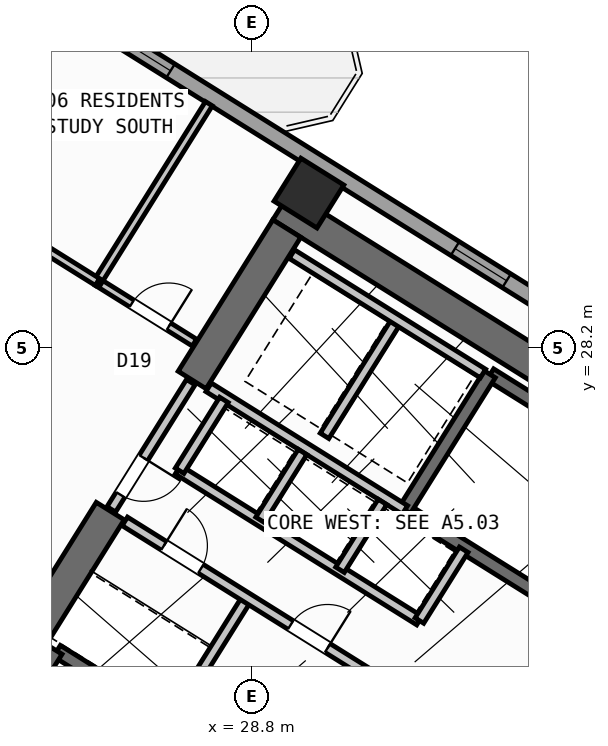
"""IFC4 building model, lengths in metres.
Left out: names, types, materials, properties, quantities, classifications, styles, units other than length and angle.
Written with IfcOpenShell. Run it as: python <this file> out.ifc"""

import sys

from ifc_helpers import new_model, si_unit, direction, frame, frame_2d, origin, origin_2d, place, context, subcontext, project, spatial, rectangle, hollow_rectangle, extrude, source, transform, mapped, element, fill, save


model = new_model("IFC4")
c1 = context("Model", 3, precision=1e-05, world=origin(), true_north=direction((0.0, 1.0)))
c2 = subcontext(c1, "Body", "Model", "MODEL_VIEW")
j1 = project(units=[si_unit("LENGTHUNIT", "METRE"), si_unit("PLANEANGLEUNIT", "RADIAN")], contexts=[c1])
p1 = place(None, origin())
s1 = spatial("IfcSite", under=j1, at=p1, CompositionType="ELEMENT")
p2 = place(p1, origin())
s2 = spatial("IfcBuilding", under=s1, at=p2, CompositionType="ELEMENT")
p3 = place(p2, frame((0.0, 0.0, 27.6)))
s3 = spatial("IfcBuildingStorey", under=s2, at=p3, CompositionType="ELEMENT", Elevation=27.6)
p4 = place(p3, frame((40.615, 23.983, 0.0), z_axis=(0.0, 0.0, 1.0), x_axis=(-0.848045953968, 0.529922692436, 0.0)))
e1 = element("IfcWall", 1, at=p4, inside=s3, PredefinedType="SHEAR", context=c2, shape_type="SweptSolid", body=[
    extrude(rectangle(XDim=13.24, YDim=0.65, at=frame_2d((6.62, 0.0))), origin(), (0.0, 0.0, 1.0), 3.35),
])
p5 = place(p3, frame((29.491, 30.552, 0.0), z_axis=(0.0, 0.0, 1.0), x_axis=(-0.529893103397, -0.8480644427, 0.0)))
e2 = element("IfcWall", 2, at=p5, inside=s3, PredefinedType="SHEAR", context=c2, shape_type="SweptSolid", body=[
    extrude(rectangle(XDim=3.525, YDim=0.65, at=frame_2d((1.763, 0.0))), origin(), (0.0, 0.0, 1.0), 3.35),
])
p6 = place(p3, frame((26.007, 24.976, 0.0), z_axis=(0.0, 0.0, 1.0), x_axis=(-0.529916319127, -0.848049936456, 0.0)))
e3 = element("IfcWall", 3, at=p6, inside=s3, PredefinedType="SHEAR", context=c2, shape_type="SweptSolid", body=[
    extrude(rectangle(XDim=6.375, YDim=0.65, at=frame_2d((3.188, 0.0))), origin(), (0.0, 0.0, 1.0), 3.35),
])
m1 = source(origin(), c2, "Body", "SweptSolid", [
    extrude(hollow_rectangle(XDim=1.0, YDim=1.0, WallThickness=0.04, at=origin_2d()), origin(), (0.0, 0.0, 1.0), 3.6),
])
for number, where, z_axis, x_axis in (
    (4, (29.928, 31.251, 0.0), (0.0, 0.0, 1.0), (-0.848, 0.53, 0.0)),
    (5, (24.5, 34.643, 0.0), (0.0, 0.0, 1.0), (-0.848, 0.53, 0.0)),
):
    element("IfcColumn", number, at=place(p3, frame(where, z_axis=z_axis, x_axis=x_axis)), inside=s3, PredefinedType="COLUMN", context=c2, shape_type="MappedRepresentation", body=[
        mapped(m1, transform((0.0, 0.0, 0.0), scale=1.0)),
    ])
p7 = place(p3, frame((29.268, 6.429, 0.0), z_axis=(0.0, 0.0, 1.0), x_axis=(-0.848049971435, 0.529916263149, 0.0)))
e6 = element("IfcWall", 6, at=p7, inside=s3, PredefinedType="STANDARD", context=c2, shape_type="SweptSolid", body=[
    extrude(rectangle(XDim=31.588, YDim=0.32, at=frame_2d((15.794, 0.0))), origin(), (0.0, 0.0, 1.0), 3.35),
])
p8 = place(p7, frame((16.362, 0.0, 0.0)))
e7 = element("IfcOpeningElement", 7, at=p8, cuts=e6, PredefinedType="OPENING", context=c2, shape_type="SweptSolid", body=[
    extrude(rectangle(XDim=1.2, YDim=2.15, at=frame_2d((0.6, 1.075))), frame((0.0, 0.17, 0.0), z_axis=(0.0, -1.0, 0.0), x_axis=(1.0, 0.0, 0.0)), (0.0, 0.0, 1.0), 0.34),
])
p9 = place(p7, frame((2.989, 0.0, 0.8)))
e8 = element("IfcOpeningElement", 8, at=p9, cuts=e6, PredefinedType="OPENING", context=c2, shape_type="SweptSolid", body=[
    extrude(rectangle(XDim=2.1, YDim=1.55, at=frame_2d((1.05, 0.775))), frame((0.0, 0.17, 0.0), z_axis=(0.0, -1.0, 0.0), x_axis=(1.0, 0.0, 0.0)), (0.0, 0.0, 1.0), 0.34),
])
p10 = place(p7, frame((8.359, 0.0, 0.8)))
e9 = element("IfcOpeningElement", 9, at=p10, cuts=e6, PredefinedType="OPENING", context=c2, shape_type="SweptSolid", body=[
    extrude(rectangle(XDim=2.1, YDim=1.55, at=frame_2d((1.05, 0.775))), frame((0.0, 0.17, 0.0), z_axis=(0.0, -1.0, 0.0), x_axis=(1.0, 0.0, 0.0)), (0.0, 0.0, 1.0), 0.34),
])
p11 = place(p7, frame((13.284, 0.0, 0.95)))
e10 = element("IfcOpeningElement", 10, at=p11, cuts=e6, PredefinedType="OPENING", context=c2, shape_type="SweptSolid", body=[
    extrude(rectangle(XDim=1.2, YDim=1.4, at=frame_2d((0.6, 0.7))), frame((0.0, 0.17, 0.0), z_axis=(0.0, -1.0, 0.0), x_axis=(1.0, 0.0, 0.0)), (0.0, 0.0, 1.0), 0.34),
])
p12 = place(p7, frame((29.188, 0.0, 0.95)))
e11 = element("IfcOpeningElement", 11, at=p12, cuts=e6, PredefinedType="OPENING", context=c2, shape_type="SweptSolid", body=[
    extrude(rectangle(XDim=1.2, YDim=1.4, at=frame_2d((0.6, 0.7))), frame((0.0, 0.17, 0.0), z_axis=(0.0, -1.0, 0.0), x_axis=(1.0, 0.0, 0.0)), (0.0, 0.0, 1.0), 0.34),
])
p13 = place(p7, frame((19.11, 0.0, 1.0)))
e12 = element("IfcOpeningElement", 12, at=p13, cuts=e6, PredefinedType="OPENING", context=c2, shape_type="SweptSolid", body=[
    extrude(rectangle(XDim=0.9, YDim=1.25, at=frame_2d((0.45, 0.625))), frame((0.0, 0.17, 0.0), z_axis=(0.0, -1.0, 0.0), x_axis=(1.0, 0.0, 0.0)), (0.0, 0.0, 1.0), 0.34),
])
p14 = place(p7, frame((21.226, 0.0, 1.0)))
e13 = element("IfcOpeningElement", 13, at=p14, cuts=e6, PredefinedType="OPENING", context=c2, shape_type="SweptSolid", body=[
    extrude(rectangle(XDim=0.9, YDim=1.25, at=frame_2d((0.45, 0.625))), frame((0.0, 0.17, 0.0), z_axis=(0.0, -1.0, 0.0), x_axis=(1.0, 0.0, 0.0)), (0.0, 0.0, 1.0), 0.34),
])
p15 = place(p7, frame((23.014, 0.0, 1.0)))
e14 = element("IfcOpeningElement", 14, at=p15, cuts=e6, PredefinedType="OPENING", context=c2, shape_type="SweptSolid", body=[
    extrude(rectangle(XDim=0.9, YDim=1.25, at=frame_2d((0.45, 0.625))), frame((0.0, 0.17, 0.0), z_axis=(0.0, -1.0, 0.0), x_axis=(1.0, 0.0, 0.0)), (0.0, 0.0, 1.0), 0.34),
])
p16 = place(p7, frame((24.802, 0.0, 1.0)))
e15 = element("IfcOpeningElement", 15, at=p16, cuts=e6, PredefinedType="OPENING", context=c2, shape_type="SweptSolid", body=[
    extrude(rectangle(XDim=0.9, YDim=1.25, at=frame_2d((0.45, 0.625))), frame((0.0, 0.17, 0.0), z_axis=(0.0, -1.0, 0.0), x_axis=(1.0, 0.0, 0.0)), (0.0, 0.0, 1.0), 0.34),
])
p17 = place(p7, frame((26.59, 0.0, 1.0)))
e16 = element("IfcOpeningElement", 16, at=p17, cuts=e6, PredefinedType="OPENING", context=c2, shape_type="SweptSolid", body=[
    extrude(rectangle(XDim=0.9, YDim=1.25, at=frame_2d((0.45, 0.625))), frame((0.0, 0.17, 0.0), z_axis=(0.0, -1.0, 0.0), x_axis=(1.0, 0.0, 0.0)), (0.0, 0.0, 1.0), 0.34),
])
p18 = place(p3, frame((14.138, 41.825, 0.0), z_axis=(0.0, 0.0, 1.0), x_axis=(0.848046498049, -0.529921821731, 0.0)))
e17 = element("IfcWall", 17, at=p18, inside=s3, PredefinedType="STANDARD", context=c2, shape_type="SweptSolid", body=[
    extrude(rectangle(XDim=31.588, YDim=0.32, at=frame_2d((15.794, 0.0))), origin(), (0.0, 0.0, 1.0), 3.35),
])
p19 = place(p18, frame((3.369, 0.0, 0.0)))
e18 = element("IfcOpeningElement", 18, at=p19, cuts=e17, PredefinedType="OPENING", context=c2, shape_type="SweptSolid", body=[
    extrude(rectangle(XDim=1.05, YDim=2.15, at=frame_2d((0.525, 1.075))), frame((0.0, 0.17, 0.0), z_axis=(0.0, -1.0, 0.0), x_axis=(1.0, 0.0, 0.0)), (0.0, 0.0, 1.0), 0.34),
])
p20 = place(p18, frame((0.946, 0.0, 0.85)))
e19 = element("IfcOpeningElement", 19, at=p20, cuts=e17, PredefinedType="OPENING", context=c2, shape_type="SweptSolid", body=[
    extrude(rectangle(XDim=1.8, YDim=1.5, at=frame_2d((0.9, 0.75))), frame((0.0, 0.17, 0.0), z_axis=(0.0, -1.0, 0.0), x_axis=(1.0, 0.0, 0.0)), (0.0, 0.0, 1.0), 0.34),
])
p21 = place(p18, frame((8.46, 0.0, 0.85)))
e20 = element("IfcOpeningElement", 20, at=p21, cuts=e17, PredefinedType="OPENING", context=c2, shape_type="SweptSolid", body=[
    extrude(rectangle(XDim=1.8, YDim=1.5, at=frame_2d((0.9, 0.75))), frame((0.0, 0.17, 0.0), z_axis=(0.0, -1.0, 0.0), x_axis=(1.0, 0.0, 0.0)), (0.0, 0.0, 1.0), 0.34),
])
p22 = place(p18, frame((13.899, 0.0, 0.85)))
e21 = element("IfcOpeningElement", 21, at=p22, cuts=e17, PredefinedType="OPENING", context=c2, shape_type="SweptSolid", body=[
    extrude(rectangle(XDim=1.5, YDim=1.5, at=frame_2d((0.75, 0.75))), frame((0.0, 0.17, 0.0), z_axis=(0.0, -1.0, 0.0), x_axis=(1.0, 0.0, 0.0)), (0.0, 0.0, 1.0), 0.34),
])
p23 = place(p18, frame((22.019, 0.0, 0.95)))
e22 = element("IfcOpeningElement", 22, at=p23, cuts=e17, PredefinedType="OPENING", context=c2, shape_type="SweptSolid", body=[
    extrude(rectangle(XDim=1.2, YDim=1.4, at=frame_2d((0.6, 0.7))), frame((0.0, 0.17, 0.0), z_axis=(0.0, -1.0, 0.0), x_axis=(1.0, 0.0, 0.0)), (0.0, 0.0, 1.0), 0.34),
])
p24 = place(p18, frame((27.569, 0.0, 0.95)))
e23 = element("IfcOpeningElement", 23, at=p24, cuts=e17, PredefinedType="OPENING", context=c2, shape_type="SweptSolid", body=[
    extrude(rectangle(XDim=1.2, YDim=1.4, at=frame_2d((0.6, 0.7))), frame((0.0, 0.17, 0.0), z_axis=(0.0, -1.0, 0.0), x_axis=(1.0, 0.0, 0.0)), (0.0, 0.0, 1.0), 0.34),
])
p25 = place(p3, frame((31.28, 18.261, 0.0), z_axis=(0.0, 0.0, 1.0), x_axis=(-0.848051618787, 0.529913626805, 0.0)))
e24 = element("IfcWall", 24, at=p25, inside=s3, PredefinedType="SHEAR", context=c2, shape_type="SweptSolid", body=[
    extrude(rectangle(XDim=7.46, YDim=0.26, at=frame_2d((3.73, 0.0))), origin(), (0.0, 0.0, 1.0), 3.35),
])
p26 = place(p25, frame((0.36, 0.0, 0.0)))
e25 = element("IfcOpeningElement", 25, at=p26, cuts=e24, PredefinedType="OPENING", context=c2, shape_type="SweptSolid", body=[
    extrude(rectangle(XDim=0.86, YDim=2.05, at=frame_2d((0.43, 1.025))), frame((0.0, 0.14, 0.0), z_axis=(0.0, -1.0, 0.0), x_axis=(1.0, 0.0, 0.0)), (0.0, 0.0, 1.0), 0.28),
])
p27 = place(p3, frame((24.945, 22.22, 0.0), z_axis=(0.0, 0.0, 1.0), x_axis=(-0.529908658664, -0.84805472316, 0.0)))
e26 = element("IfcWall", 26, at=p27, inside=s3, PredefinedType="SHEAR", context=c2, shape_type="SweptSolid", body=[
    extrude(rectangle(XDim=3.16, YDim=0.26, at=frame_2d((1.58, 0.0))), origin(), (0.0, 0.0, 1.0), 3.35),
])
p28 = place(p3, frame((39.721, 23.788, 0.0), z_axis=(0.0, 0.0, 1.0), x_axis=(-0.848054434086, 0.529909121291, 0.0)))
e27 = element("IfcWall", 27, at=p28, inside=s3, PredefinedType="SHEAR", context=c2, shape_type="SweptSolid", body=[
    extrude(rectangle(XDim=7.33, YDim=0.26, at=frame_2d((3.665, 0.0))), origin(), (0.0, 0.0, 1.0), 3.35),
])
p29 = place(p3, frame((38.046, 21.108, 0.0), z_axis=(0.0, 0.0, 1.0), x_axis=(-0.848054434086, 0.529909121291, 0.0)))
e28 = element("IfcWall", 28, at=p29, inside=s3, PredefinedType="SHEAR", context=c2, shape_type="SweptSolid", body=[
    extrude(rectangle(XDim=7.33, YDim=0.26, at=frame_2d((3.665, 0.0))), origin(), (0.0, 0.0, 1.0), 3.35),
])
p30 = place(p29, frame((0.22, 0.0, 0.0)))
e29 = element("IfcOpeningElement", 29, at=p30, cuts=e28, PredefinedType="OPENING", context=c2, shape_type="SweptSolid", body=[
    extrude(rectangle(XDim=1.1, YDim=2.1, at=frame_2d((0.55, 1.05))), frame((0.0, 0.14, 0.0), z_axis=(0.0, -1.0, 0.0), x_axis=(1.0, 0.0, 0.0)), (0.0, 0.0, 1.0), 0.28),
])
p31 = place(p3, frame((33.496, 27.677, 0.0), z_axis=(0.0, 0.0, 1.0), x_axis=(-0.529908658664, -0.84805472316, 0.0)))
e30 = element("IfcWall", 30, at=p31, inside=s3, PredefinedType="SHEAR", context=c2, shape_type="SweptSolid", body=[
    extrude(rectangle(XDim=3.16, YDim=0.26, at=frame_2d((1.58, 0.0))), origin(), (0.0, 0.0, 1.0), 3.35),
])
p32 = place(p3, frame((31.822, 24.998, 0.0), z_axis=(0.0, 0.0, 1.0), x_axis=(-0.848058348634, 0.529902856485, 0.0)))
e31 = element("IfcWall", 31, at=p32, inside=s3, PredefinedType="STANDARD", context=c2, shape_type="SweptSolid", body=[
    extrude(rectangle(XDim=4.568, YDim=0.2, at=frame_2d((2.284, 0.0))), origin(), (0.0, 0.0, 1.0), 3.34),
])
p33 = place(p3, frame((32.108, 22.814, 0.0), z_axis=(0.0, 0.0, 1.0), x_axis=(-0.848042229521, 0.529928652696, 0.0)))
e32 = element("IfcWall", 32, at=p33, inside=s3, PredefinedType="STANDARD", context=c2, shape_type="SweptSolid", body=[
    extrude(rectangle(XDim=5.62, YDim=0.2, at=frame_2d((2.81, 0.0))), origin(), (0.0, 0.0, 1.0), 3.34),
])
p34 = place(p3, frame((32.982, 24.213, 0.0), z_axis=(0.0, 0.0, 1.0), x_axis=(-0.529839334948, -0.84809803628, 0.0)))
e33 = element("IfcWall", 33, at=p34, inside=s3, PredefinedType="STANDARD", context=c2, shape_type="SweptSolid", body=[
    extrude(rectangle(XDim=1.65, YDim=0.2, at=frame_2d((0.825, 0.0))), origin(), (0.0, 0.0, 1.0), 3.34),
])
p35 = place(p3, frame((28.25, 27.17, 0.0), z_axis=(0.0, 0.0, 1.0), x_axis=(-0.529905827651, -0.848056492117, 0.0)))
e34 = element("IfcWall", 34, at=p35, inside=s3, PredefinedType="STANDARD", context=c2, shape_type="SweptSolid", body=[
    extrude(rectangle(XDim=1.65, YDim=0.2, at=frame_2d((0.825, 0.0))), origin(), (0.0, 0.0, 1.0), 3.34),
])
p36 = place(p3, frame((31.645, 28.716, 0.0), z_axis=(0.0, 0.0, 1.0), x_axis=(-0.52986693015, -0.848080795876, 0.0)))
e35 = element("IfcWall", 35, at=p36, inside=s3, PredefinedType="STANDARD", context=c2, shape_type="SweptSolid", body=[
    extrude(rectangle(XDim=2.66, YDim=0.2, at=frame_2d((1.33, 0.0))), origin(), (0.0, 0.0, 1.0), 3.34),
])
p37 = place(p3, frame((33.363, 27.69, 0.0), z_axis=(0.0, 0.0, 1.0), x_axis=(-0.848053806312, 0.529910125964, 0.0)))
e36 = element("IfcWall", 36, at=p37, inside=s3, PredefinedType="STANDARD", context=c2, shape_type="SweptSolid", body=[
    extrude(rectangle(XDim=4.448, YDim=0.2, at=frame_2d((2.224, 0.0))), origin(), (0.0, 0.0, 1.0), 3.34),
])
for number, where, z_axis, x_axis in (
    (37, (31.379, 25.156, 0.0), (0.0, 0.0, 1.0), (-0.53, -0.848, 0.0)),
    (38, (29.801, 26.142, 0.0), (0.0, 0.0, 1.0), (-0.53, -0.848, 0.0)),
):
    element("IfcWall", number, at=place(p3, frame(where, z_axis=z_axis, x_axis=x_axis)), inside=s3, PredefinedType="STANDARD", context=c2, shape_type="SweptSolid", body=[
        extrude(rectangle(XDim=1.58, YDim=0.2, at=frame_2d((0.79, 0.0))), origin(), (0.0, 0.0, 1.0), 3.34),
    ])
p38 = place(p3, frame((28.71, 23.263, 0.0), z_axis=(0.0, 0.0, 1.0), x_axis=(-0.529907497854, -0.848055448493, 0.0)))
e39 = element("IfcWall", 39, at=p38, inside=s3, PredefinedType="STANDARD", context=c2, shape_type="SweptSolid", body=[
    extrude(rectangle(XDim=2.88, YDim=0.2, at=frame_2d((1.44, 0.0))), origin(), (0.0, 0.0, 1.0), 3.34),
])
p39 = place(p3, frame((31.525, 21.504, 0.0), z_axis=(0.0, 0.0, 1.0), x_axis=(-0.848044998614, 0.529924221305, 0.0)))
e40 = element("IfcWall", 40, at=p39, inside=s3, PredefinedType="STANDARD", context=c2, shape_type="SweptSolid", body=[
    extrude(rectangle(XDim=6.168, YDim=0.2, at=frame_2d((3.084, 0.0))), origin(), (0.0, 0.0, 1.0), 3.34),
])
p40 = place(p39, frame((4.4, 0.0, 0.0)))
e41 = element("IfcOpeningElement", 41, at=p40, cuts=e40, PredefinedType="OPENING", context=c2, shape_type="SweptSolid", body=[
    extrude(rectangle(XDim=0.86, YDim=2.05, at=frame_2d((0.43, 1.025))), frame((0.0, 0.11, 0.0), z_axis=(0.0, -1.0, 0.0), x_axis=(1.0, 0.0, 0.0)), (0.0, 0.0, 1.0), 0.22),
])
p41 = place(p39, frame((1.45, 0.0, 0.0)))
e42 = element("IfcOpeningElement", 42, at=p41, cuts=e40, PredefinedType="OPENING", context=c2, shape_type="SweptSolid", body=[
    extrude(rectangle(XDim=0.86, YDim=2.05, at=frame_2d((0.43, 1.025))), frame((0.0, 0.11, 0.0), z_axis=(0.0, -1.0, 0.0), x_axis=(1.0, 0.0, 0.0)), (0.0, 0.0, 1.0), 0.22),
])
p42 = place(p3, frame((27.596, 27.52, 0.0), z_axis=(0.0, 0.0, 1.0), x_axis=(-0.529865479138, -0.848081702443, 0.0)))
e43 = element("IfcWall", 43, at=p42, inside=s3, PredefinedType="STANDARD", context=c2, shape_type="SweptSolid", body=[
    extrude(rectangle(XDim=2.96, YDim=0.2, at=frame_2d((1.48, 0.0))), origin(), (0.0, 0.0, 1.0), 3.34),
])
p43 = place(p42, frame((1.76, 0.0, 0.0)))
e44 = element("IfcOpeningElement", 44, at=p43, cuts=e43, PredefinedType="OPENING", context=c2, shape_type="SweptSolid", body=[
    extrude(rectangle(XDim=0.86, YDim=2.05, at=frame_2d((0.43, 1.025))), frame((0.0, 0.11, 0.0), z_axis=(0.0, -1.0, 0.0), x_axis=(1.0, 0.0, 0.0)), (0.0, 0.0, 1.0), 0.22),
])
p44 = place(p3, frame((27.669, 28.3, 0.0), z_axis=(0.0, 0.0, 1.0), x_axis=(-0.848040823168, 0.52993090327, 0.0)))
e45 = element("IfcWall", 45, at=p44, inside=s3, PredefinedType="PARTITIONING", context=c2, shape_type="SweptSolid", body=[
    extrude(rectangle(XDim=2.258, YDim=0.16, at=frame_2d((1.129, 0.0))), origin(), (0.0, 0.0, 1.0), 3.34),
])
p45 = place(p44, frame((0.598, 0.0, 0.0)))
e46 = element("IfcOpeningElement", 46, at=p45, cuts=e45, PredefinedType="OPENING", context=c2, shape_type="SweptSolid", body=[
    extrude(rectangle(XDim=0.86, YDim=2.05, at=frame_2d((0.43, 1.025))), frame((0.0, 0.09, 0.0), z_axis=(0.0, -1.0, 0.0), x_axis=(1.0, 0.0, 0.0)), (0.0, 0.0, 1.0), 0.18),
])
p46 = place(p3, frame((27.953, 33.016, 0.0), z_axis=(0.0, 0.0, 1.0), x_axis=(-0.529872022255, -0.848077614391, 0.0)))
e47 = element("IfcWall", 47, at=p46, inside=s3, PredefinedType="PARTITIONING", context=c2, shape_type="SweptSolid", body=[
    extrude(rectangle(XDim=4.15, YDim=0.16, at=frame_2d((2.075, 0.0))), origin(), (0.0, 0.0, 1.0), 3.34),
])
p47 = place(p3, frame((25.754, 29.497, 0.0), z_axis=(0.0, 0.0, 1.0), x_axis=(-0.848045850158, 0.529922858565, 0.0)))
e48 = element("IfcWall", 48, at=p47, inside=s3, PredefinedType="PARTITIONING", context=c2, shape_type="SweptSolid", body=[
    extrude(rectangle(XDim=16.73, YDim=0.16, at=frame_2d((8.365, 0.0))), origin(), (0.0, 0.0, 1.0), 3.34),
])
p48 = place(p47, frame((1.588, 0.0, 0.0)))
e49 = element("IfcOpeningElement", 49, at=p48, cuts=e48, PredefinedType="OPENING", context=c2, shape_type="SweptSolid", body=[
    extrude(rectangle(XDim=1.0, YDim=2.1, at=frame_2d((0.5, 1.05))), frame((0.0, 0.09, 0.0), z_axis=(0.0, -1.0, 0.0), x_axis=(1.0, 0.0, 0.0)), (0.0, 0.0, 1.0), 0.18),
])
p49 = place(p47, frame((6.685, 0.0, 0.0)))
e50 = element("IfcOpeningElement", 50, at=p49, cuts=e48, PredefinedType="OPENING", context=c2, shape_type="SweptSolid", body=[
    extrude(rectangle(XDim=1.0, YDim=2.1, at=frame_2d((0.5, 1.05))), frame((0.0, 0.09, 0.0), z_axis=(0.0, -1.0, 0.0), x_axis=(1.0, 0.0, 0.0)), (0.0, 0.0, 1.0), 0.18),
])
p50 = place(p47, frame((12.951, 0.0, 0.0)))
e51 = element("IfcOpeningElement", 51, at=p50, cuts=e48, PredefinedType="OPENING", context=c2, shape_type="SweptSolid", body=[
    extrude(rectangle(XDim=1.0, YDim=2.1, at=frame_2d((0.5, 1.05))), frame((0.0, 0.09, 0.0), z_axis=(0.0, -1.0, 0.0), x_axis=(1.0, 0.0, 0.0)), (0.0, 0.0, 1.0), 0.18),
])
m2 = source(origin(), c2, "Body", "SweptSolid", [
    extrude(rectangle(XDim=1.5, YDim=1.5, at=frame_2d((0.75, 0.75))), frame((0.0, 0.03, 0.0), z_axis=(0.0, -1.0, 0.0), x_axis=(1.0, 0.0, 0.0)), (0.0, 0.0, 1.0), 0.06),
])
p51 = place(p22, origin())
e52 = element("IfcWindow", 52, at=p51, inside=s3, PartitioningType="SINGLE_PANEL", PredefinedType="WINDOW", context=c2, shape_type="MappedRepresentation", body=[
    mapped(m2, transform((0.0, 0.0, 0.0), scale=1.0)),
])
fill(e21, e52)
m3 = source(origin(), c2, "Body", "SweptSolid", [
    extrude(rectangle(XDim=1.2, YDim=1.4, at=frame_2d((0.6, 0.7))), frame((0.0, 0.03, 0.0), z_axis=(0.0, -1.0, 0.0), x_axis=(1.0, 0.0, 0.0)), (0.0, 0.0, 1.0), 0.06),
])
p52 = place(p23, origin())
e53 = element("IfcWindow", 53, at=p52, inside=s3, PartitioningType="SINGLE_PANEL", PredefinedType="WINDOW", context=c2, shape_type="MappedRepresentation", body=[
    mapped(m3, transform((0.0, 0.0, 0.0), scale=1.0)),
])
fill(e22, e53)
m4 = source(origin(), c2, "Body", "SweptSolid", [
    extrude(rectangle(XDim=0.86, YDim=2.05, at=frame_2d((0.43, 1.025))), frame((0.0, 0.025, 0.0), z_axis=(0.0, -1.0, 0.0), x_axis=(1.0, 0.0, 0.0)), (0.0, 0.0, 1.0), 0.05),
])
p53 = place(p40, frame((0.86, 0.0, 0.0), z_axis=(0.0, 0.0, 1.0), x_axis=(-1.0, 0.0, 0.0)))
e54 = element("IfcDoor", 54, at=p53, inside=s3, OperationType="SINGLE_SWING_LEFT", PredefinedType="DOOR", context=c2, shape_type="MappedRepresentation", body=[
    mapped(m4, transform((0.0, 0.0, 0.0), scale=1.0)),
])
fill(e41, e54)
p54 = place(p41, frame((0.86, 0.0, 0.0), z_axis=(0.0, 0.0, 1.0), x_axis=(-1.0, 0.0, 0.0)))
e55 = element("IfcDoor", 55, at=p54, inside=s3, OperationType="SINGLE_SWING_RIGHT", PredefinedType="DOOR", context=c2, shape_type="MappedRepresentation", body=[
    mapped(m4, transform((0.0, 0.0, 0.0), scale=1.0)),
])
fill(e42, e55)
p55 = place(p45, frame((0.86, 0.0, 0.0), z_axis=(0.0, 0.0, 1.0), x_axis=(-1.0, 0.0, 0.0)))
e56 = element("IfcDoor", 56, at=p55, inside=s3, OperationType="SINGLE_SWING_RIGHT", PredefinedType="DOOR", context=c2, shape_type="MappedRepresentation", body=[
    mapped(m4, transform((0.0, 0.0, 0.0), scale=1.0)),
])
fill(e46, e56)
p56 = place(p43, origin())
e57 = element("IfcDoor", 57, at=p56, inside=s3, OperationType="SINGLE_SWING_LEFT", PredefinedType="DOOR", context=c2, shape_type="MappedRepresentation", body=[
    mapped(m4, transform((0.0, 0.0, 0.0), scale=1.0)),
])
fill(e44, e57)
save(model, sys.argv[1])
